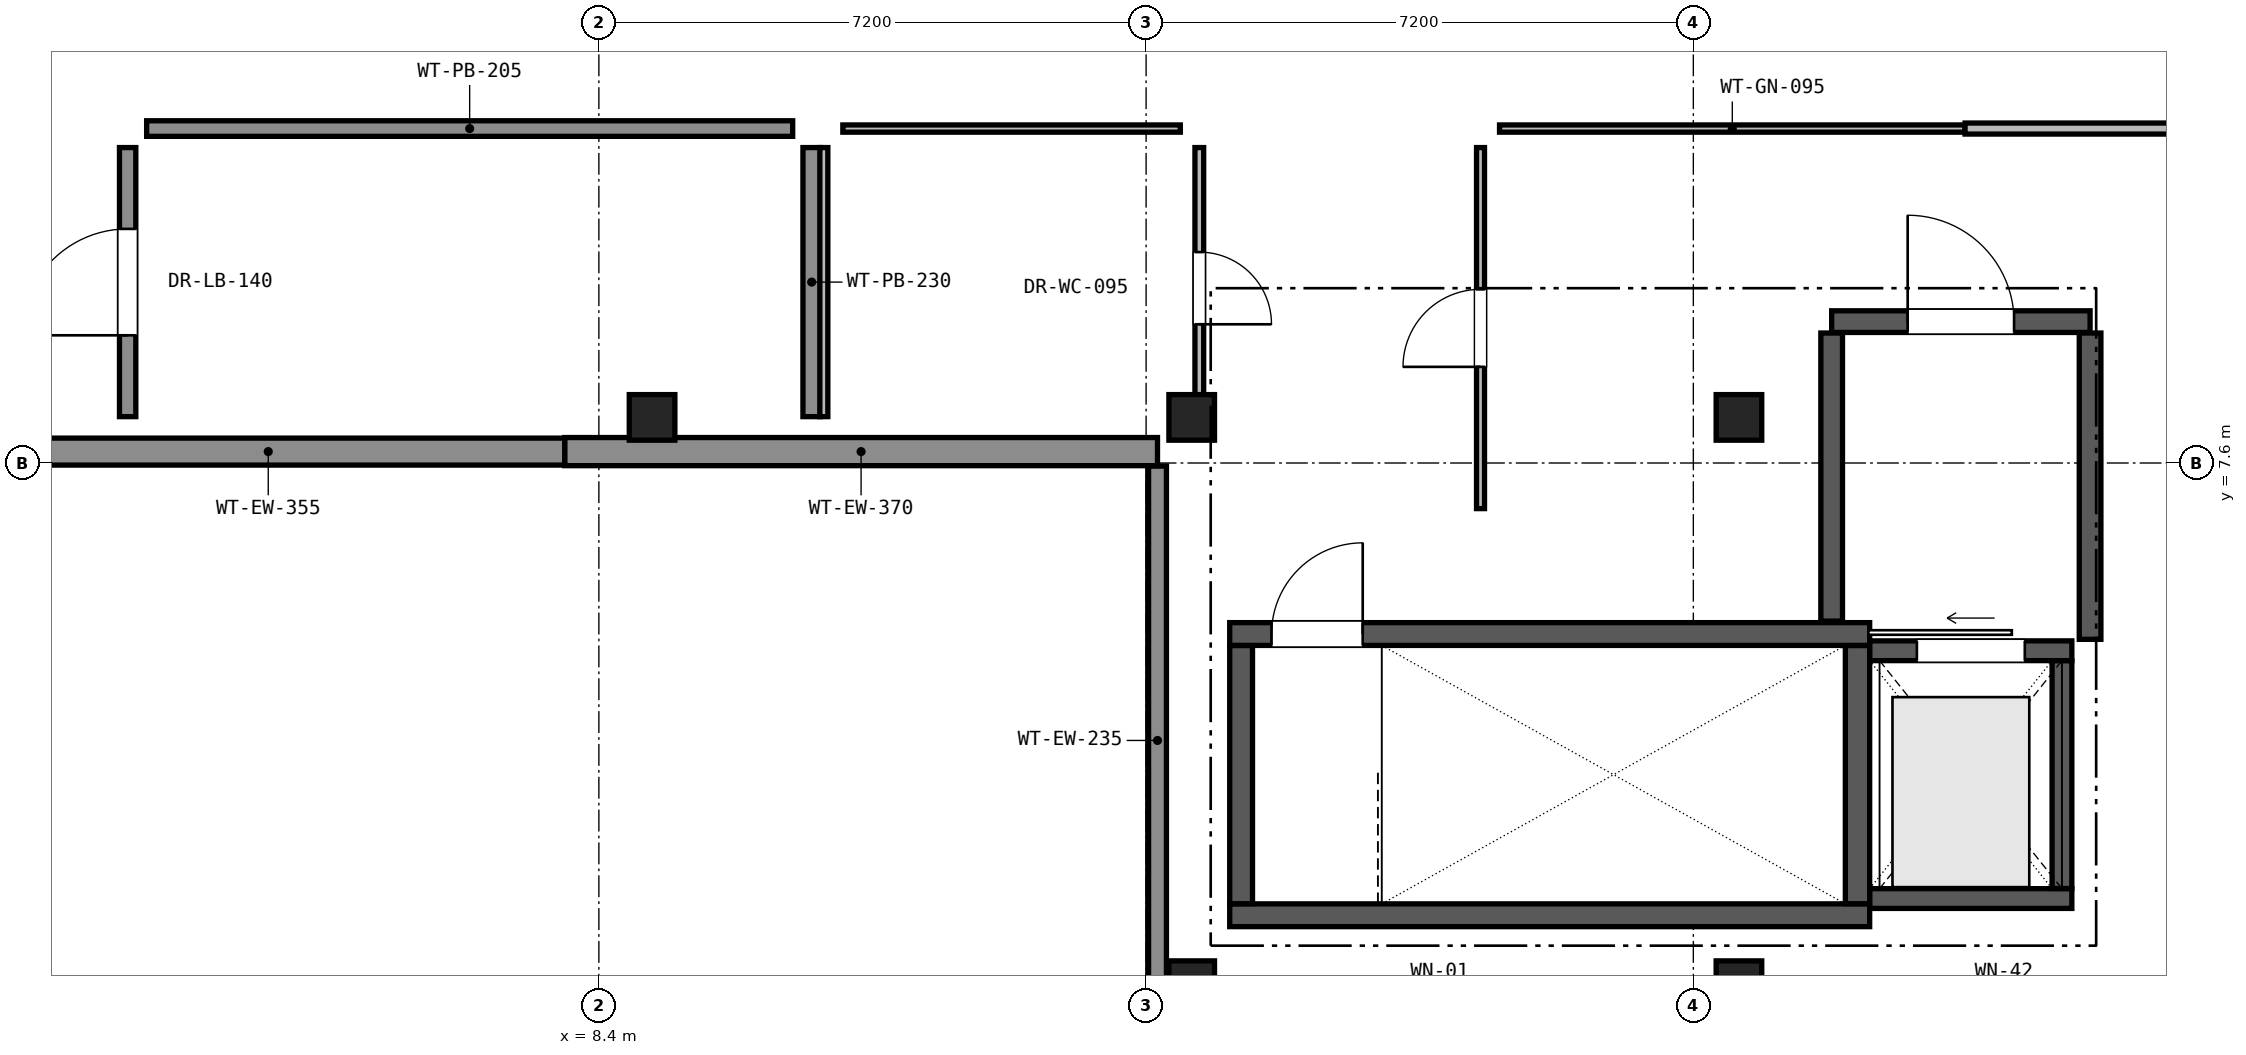
"""IFC4 building model, lengths in metres.
Left out: names, types, materials, properties, quantities, classifications, styles, units other than length and angle.
Written with IfcOpenShell. Run it as: python <this file> out.ifc"""

import sys

from ifc_helpers import new_model, si_unit, direction, frame, frame_2d, origin, origin_2d, place, context, subcontext, project, spatial, rectangle, extrude, element, fill, save


model = new_model("IFC4")
c1 = context("Model", 3, precision=1e-05, world=origin(), true_north=direction((0.0, 1.0)))
c2 = subcontext(c1, "Body", "Model", "MODEL_VIEW")
j1 = project(units=[si_unit("LENGTHUNIT", "METRE"), si_unit("PLANEANGLEUNIT", "RADIAN")], contexts=[c1])
p1 = place(None, origin())
s1 = spatial("IfcSite", under=j1, at=p1, CompositionType="ELEMENT")
p2 = place(p1, origin())
s2 = spatial("IfcBuilding", under=s1, at=p2, CompositionType="ELEMENT")
p3 = place(p2, frame((0.0, 0.0, 21.76)))
s3 = spatial("IfcBuildingStorey", under=s2, at=p3, CompositionType="ELEMENT", Elevation=21.76)
for number, where, z_axis, x_axis in (
    (1, (9.1, 8.2, 0.0), (0.0, 0.0, 1.0), (1.0, 0.0, 0.0)),
    (2, (16.2, 0.75, 0.0), (0.0, 0.0, 1.0), (1.0, 0.0, 0.0)),
    (3, (16.2, 8.2, 0.0), (0.0, 0.0, 1.0), (1.0, 0.0, 0.0)),
    (4, (23.4, 0.75, 0.0), (0.0, 0.0, 1.0), (1.0, 0.0, 0.0)),
    (5, (23.4, 8.2, 0.0), (0.0, 0.0, 1.0), (1.0, 0.0, 0.0)),
):
    element("IfcColumn", number, at=place(p3, frame(where, z_axis=z_axis, x_axis=x_axis)), inside=s3, PredefinedType="COLUMN", context=c2, shape_type="SweptSolid", body=[
        extrude(rectangle(XDim=0.6, YDim=0.6, at=origin_2d()), origin(), (0.0, 0.0, 1.0), 4.08),
    ])
p4 = place(p3, frame((15.75, 0.34, 0.0), z_axis=(0.0, 0.0, 1.0), x_axis=(0.0, 1.0, 0.0)))
e6 = element("IfcWall", 6, at=p4, inside=s3, PredefinedType="SOLIDWALL", context=c2, shape_type="SweptSolid", body=[
    extrude(rectangle(XDim=7.22, YDim=0.235, at=frame_2d((3.61, 0.0))), origin(), (0.0, 0.0, 1.0), 3.81),
])
p5 = place(p3, frame((15.75, 7.75, 0.0), z_axis=(0.0, 0.0, 1.0), x_axis=(-1.0, 0.0, 0.0)))
e7 = element("IfcWall", 7, at=p5, inside=s3, PredefinedType="SOLIDWALL", context=c2, shape_type="SweptSolid", body=[
    extrude(rectangle(XDim=7.8, YDim=0.37, at=frame_2d((3.9, 0.0))), origin(), (0.0, 0.0, 1.0), 3.81),
])
p6 = place(p3, frame((7.95, 7.75, 0.0), z_axis=(0.0, 0.0, 1.0), x_axis=(-1.0, 0.0, 0.0)))
e8 = element("IfcWall", 8, at=p6, inside=s3, PredefinedType="SOLIDWALL", context=c2, shape_type="SweptSolid", body=[
    extrude(rectangle(XDim=7.8, YDim=0.355, at=frame_2d((3.9, 0.0))), origin(), (0.0, 0.0, 1.0), 3.81),
])
p7 = place(p3, frame((0.13, 7.73, 4.08), z_axis=(0.0, 0.0, 1.0), x_axis=(1.0, 0.0, 0.0)))
e9 = element("IfcWall", 9, at=p7, inside=s3, PredefinedType="PARAPET", context=c2, shape_type="SweptSolid", body=[
    extrude(rectangle(XDim=15.6, YDim=0.245, at=frame_2d((7.8, 0.0))), origin(), (0.0, 0.0, 1.0), 1.2),
])
p8 = place(p3, frame((15.73, 7.58, 4.08), z_axis=(0.0, 0.0, 1.0), x_axis=(0.0, -1.0, 0.0)))
e10 = element("IfcWall", 10, at=p8, inside=s3, PredefinedType="PARAPET", context=c2, shape_type="SweptSolid", body=[
    extrude(rectangle(XDim=7.3, YDim=0.245, at=frame_2d((3.65, 0.0))), origin(), (0.0, 0.0, 1.0), 1.2),
])
p9 = place(p3, frame((16.7, 1.65, 0.0), z_axis=(0.0, 0.0, 1.0), x_axis=(1.0, 0.0, 0.0)))
e11 = element("IfcWall", 11, at=p9, inside=s3, PredefinedType="SHEAR", context=c2, shape_type="SweptSolid", body=[
    extrude(rectangle(XDim=8.42, YDim=0.3, at=frame_2d((4.21, 0.0))), origin(), (0.0, 0.0, 1.0), 3.81),
])
p10 = place(p3, frame((16.7, 5.35, 0.0), z_axis=(0.0, 0.0, 1.0), x_axis=(1.0, 0.0, 0.0)))
e12 = element("IfcWall", 12, at=p10, inside=s3, PredefinedType="SHEAR", context=c2, shape_type="SweptSolid", body=[
    extrude(rectangle(XDim=8.42, YDim=0.3, at=frame_2d((4.21, 0.0))), origin(), (0.0, 0.0, 1.0), 3.81),
])
p11 = place(p10, frame((0.55, 0.0, 0.0)))
e13 = element("IfcOpeningElement", 13, at=p11, cuts=e12, PredefinedType="OPENING", context=c2, shape_type="SweptSolid", body=[
    extrude(rectangle(XDim=1.2, YDim=2.2, at=frame_2d((0.6, 1.1))), frame((0.0, 0.16, 0.0), z_axis=(0.0, -1.0, 0.0), x_axis=(1.0, 0.0, 0.0)), (0.0, 0.0, 1.0), 0.32),
])
p12 = place(p3, frame((16.85, 1.802, 0.0), z_axis=(0.0, 0.0, 1.0), x_axis=(0.0, 1.0, 0.0)))
e14 = element("IfcWall", 14, at=p12, inside=s3, PredefinedType="SHEAR", context=c2, shape_type="SweptSolid", body=[
    extrude(rectangle(XDim=3.396, YDim=0.3, at=frame_2d((1.698, 0.0))), origin(), (0.0, 0.0, 1.0), 3.81),
])
p13 = place(p3, frame((24.96, 1.802, 0.0), z_axis=(0.0, 0.0, 1.0), x_axis=(0.0, 1.0, 0.0)))
e15 = element("IfcWall", 15, at=p13, inside=s3, PredefinedType="SHEAR", context=c2, shape_type="SweptSolid", body=[
    extrude(rectangle(XDim=3.396, YDim=0.32, at=frame_2d((1.698, 0.0))), origin(), (0.0, 0.0, 1.0), 3.81),
])
p14 = place(p3, frame((25.122, 1.87, 0.0), z_axis=(0.0, 0.0, 1.0), x_axis=(1.0, 0.0, 0.0)))
e16 = element("IfcWall", 16, at=p14, inside=s3, PredefinedType="SHEAR", context=c2, shape_type="SweptSolid", body=[
    extrude(rectangle(XDim=2.658, YDim=0.26, at=frame_2d((1.329, 0.0))), origin(), (0.0, 0.0, 1.0), 3.81),
])
p15 = place(p3, frame((25.122, 5.13, 0.0), z_axis=(0.0, 0.0, 1.0), x_axis=(1.0, 0.0, 0.0)))
e17 = element("IfcWall", 17, at=p15, inside=s3, PredefinedType="SHEAR", context=c2, shape_type="SweptSolid", body=[
    extrude(rectangle(XDim=2.658, YDim=0.26, at=frame_2d((1.329, 0.0))), origin(), (0.0, 0.0, 1.0), 3.81),
])
p16 = place(p15, frame((0.619, 0.0, 0.0)))
e18 = element("IfcOpeningElement", 18, at=p16, cuts=e17, PredefinedType="OPENING", context=c2, shape_type="SweptSolid", body=[
    extrude(rectangle(XDim=1.42, YDim=2.25, at=frame_2d((0.71, 1.125))), frame((0.0, 0.14, 0.0), z_axis=(0.0, -1.0, 0.0), x_axis=(1.0, 0.0, 0.0)), (0.0, 0.0, 1.0), 0.28),
])
p17 = place(p3, frame((27.65, 2.002, 0.0), z_axis=(0.0, 0.0, 1.0), x_axis=(0.0, 1.0, 0.0)))
e19 = element("IfcWall", 19, at=p17, inside=s3, PredefinedType="SHEAR", context=c2, shape_type="SweptSolid", body=[
    extrude(rectangle(XDim=2.996, YDim=0.26, at=frame_2d((1.498, 0.0))), origin(), (0.0, 0.0, 1.0), 3.81),
])
p18 = place(p3, frame((24.62, 9.46, 0.0), z_axis=(0.0, 0.0, 1.0), x_axis=(1.0, 0.0, 0.0)))
e20 = element("IfcWall", 20, at=p18, inside=s3, PredefinedType="SHEAR", context=c2, shape_type="SweptSolid", body=[
    extrude(rectangle(XDim=3.4, YDim=0.285, at=frame_2d((1.7, 0.0))), origin(), (0.0, 0.0, 1.0), 3.81),
])
p19 = place(p18, frame((1.0, 0.0, 0.0)))
e21 = element("IfcOpeningElement", 21, at=p19, cuts=e20, PredefinedType="OPENING", context=c2, shape_type="SweptSolid", body=[
    extrude(rectangle(XDim=1.4, YDim=2.25, at=frame_2d((0.7, 1.125))), frame((0.0, 0.152, 0.0), z_axis=(0.0, -1.0, 0.0), x_axis=(1.0, 0.0, 0.0)), (0.0, 0.0, 1.0), 0.305),
])
p20 = place(p3, frame((24.62, 5.52, 0.0), z_axis=(0.0, 0.0, 1.0), x_axis=(0.0, 1.0, 0.0)))
e22 = element("IfcWall", 22, at=p20, inside=s3, PredefinedType="SHEAR", context=c2, shape_type="SweptSolid", body=[
    extrude(rectangle(XDim=3.79, YDim=0.285, at=frame_2d((1.895, 0.0))), origin(), (0.0, 0.0, 1.0), 2.86),
])
p21 = place(p3, frame((28.02, 5.28, 0.0), z_axis=(0.0, 0.0, 1.0), x_axis=(0.0, 1.0, 0.0)))
e23 = element("IfcWall", 23, at=p21, inside=s3, PredefinedType="SHEAR", context=c2, shape_type="SweptSolid", body=[
    extrude(rectangle(XDim=4.03, YDim=0.285, at=frame_2d((2.015, 0.0))), origin(), (0.0, 0.0, 1.0), 2.86),
])
p22 = place(p3, frame((20.0, 7.0, 0.0), z_axis=(0.0, 0.0, 1.0), x_axis=(0.0, 1.0, 0.0)))
e24 = element("IfcWall", 24, at=p22, inside=s3, PredefinedType="PARTITIONING", context=c2, shape_type="SweptSolid", body=[
    extrude(rectangle(XDim=4.75, YDim=0.105, at=frame_2d((2.375, 0.0))), origin(), (0.0, 0.0, 1.0), 2.86),
])
p23 = place(p22, frame((1.865, 0.0, 0.0)))
e25 = element("IfcOpeningElement", 25, at=p23, cuts=e24, PredefinedType="OPENING", context=c2, shape_type="SweptSolid", body=[
    extrude(rectangle(XDim=1.02, YDim=2.15, at=frame_2d((0.51, 1.075))), frame((0.0, 0.062, 0.0), z_axis=(0.0, -1.0, 0.0), x_axis=(1.0, 0.0, 0.0)), (0.0, 0.0, 1.0), 0.125),
])
p24 = place(p3, frame((20.25, 12.0, 0.0), z_axis=(0.0, 0.0, 1.0), x_axis=(1.0, 0.0, 0.0)))
e26 = element("IfcWall", 26, at=p24, inside=s3, PredefinedType="PARTITIONING", context=c2, shape_type="SweptSolid", body=[
    extrude(rectangle(XDim=6.125, YDim=0.095, at=frame_2d((3.062, 0.0))), origin(), (0.0, 0.0, 1.0), 3.21),
])
p25 = place(p3, frame((26.375, 12.0, 0.0), z_axis=(0.0, 0.0, 1.0), x_axis=(1.0, 0.0, 0.0)))
e27 = element("IfcWall", 27, at=p25, inside=s3, PredefinedType="PARTITIONING", context=c2, shape_type="SweptSolid", body=[
    extrude(rectangle(XDim=6.125, YDim=0.145, at=frame_2d((3.062, 0.0))), origin(), (0.0, 0.0, 1.0), 3.06),
])
p26 = place(p3, frame((11.2, 11.75, 0.0), z_axis=(0.0, 0.0, 1.0), x_axis=(0.0, -1.0, 0.0)))
e28 = element("IfcWall", 28, at=p26, inside=s3, PredefinedType="PARTITIONING", context=c2, shape_type="SweptSolid", body=[
    extrude(rectangle(XDim=3.54, YDim=0.23, at=frame_2d((1.77, 0.0))), origin(), (0.0, 0.0, 1.0), 2.86),
])
p27 = place(p3, frame((2.2, 8.21, 0.0), z_axis=(0.0, 0.0, 1.0), x_axis=(0.0, 1.0, 0.0)))
e29 = element("IfcWall", 29, at=p27, inside=s3, PredefinedType="PARTITIONING", context=c2, shape_type="SweptSolid", body=[
    extrude(rectangle(XDim=3.54, YDim=0.215, at=frame_2d((1.77, 0.0))), origin(), (0.0, 0.0, 1.0), 2.86),
])
p28 = place(p27, frame((1.07, 0.0, 0.0)))
e30 = element("IfcOpeningElement", 30, at=p28, cuts=e29, PredefinedType="OPENING", context=c2, shape_type="SweptSolid", body=[
    extrude(rectangle(XDim=1.4, YDim=2.2, at=frame_2d((0.7, 1.1))), frame((0.0, 0.117, 0.0), z_axis=(0.0, -1.0, 0.0), x_axis=(1.0, 0.0, 0.0)), (0.0, 0.0, 1.0), 0.235),
])
p29 = place(p3, frame((2.45, 12.0, 0.0), z_axis=(0.0, 0.0, 1.0), x_axis=(1.0, 0.0, 0.0)))
e31 = element("IfcWall", 31, at=p29, inside=s3, PredefinedType="PARTITIONING", context=c2, shape_type="SweptSolid", body=[
    extrude(rectangle(XDim=8.5, YDim=0.205, at=frame_2d((4.25, 0.0))), origin(), (0.0, 0.0, 1.0), 3.16),
])
p30 = place(p3, frame((16.3, 11.75, 0.0), z_axis=(0.0, 0.0, 1.0), x_axis=(0.0, -1.0, 0.0)))
e32 = element("IfcWall", 32, at=p30, inside=s3, PredefinedType="PARTITIONING", context=c2, shape_type="SweptSolid", body=[
    extrude(rectangle(XDim=3.7, YDim=0.115, at=frame_2d((1.85, 0.0))), origin(), (0.0, 0.0, 1.0), 2.86),
])
p31 = place(p30, frame((1.375, 0.0, 0.0)))
e33 = element("IfcOpeningElement", 33, at=p31, cuts=e32, PredefinedType="OPENING", context=c2, shape_type="SweptSolid", body=[
    extrude(rectangle(XDim=0.95, YDim=2.15, at=frame_2d((0.475, 1.075))), frame((0.0, 0.067, 0.0), z_axis=(0.0, -1.0, 0.0), x_axis=(1.0, 0.0, 0.0)), (0.0, 0.0, 1.0), 0.135),
])
p32 = place(p3, frame((11.36, 8.21, 0.0), z_axis=(0.0, 0.0, 1.0), x_axis=(0.0, 1.0, 0.0)))
e34 = element("IfcWall", 34, at=p32, inside=s3, PredefinedType="PARTITIONING", context=c2, shape_type="SweptSolid", body=[
    extrude(rectangle(XDim=3.54, YDim=0.105, at=frame_2d((1.77, 0.0))), origin(), (0.0, 0.0, 1.0), 2.86),
])
p33 = place(p3, frame((11.61, 12.0, 0.0), z_axis=(0.0, 0.0, 1.0), x_axis=(1.0, 0.0, 0.0)))
e35 = element("IfcWall", 35, at=p33, inside=s3, PredefinedType="PARTITIONING", context=c2, shape_type="SweptSolid", body=[
    extrude(rectangle(XDim=4.44, YDim=0.095, at=frame_2d((2.22, 0.0))), origin(), (0.0, 0.0, 1.0), 3.01),
])
p34 = place(p11, origin())
e36 = element("IfcDoor", 36, at=p34, inside=s3, OperationType="SINGLE_SWING_RIGHT", PredefinedType="DOOR", context=c2, shape_type="SweptSolid", body=[
    extrude(rectangle(XDim=1.2, YDim=2.2, at=frame_2d((0.6, 1.1))), frame((0.0, 0.025, 0.0), z_axis=(0.0, -1.0, 0.0), x_axis=(1.0, 0.0, 0.0)), (0.0, 0.0, 1.0), 0.05),
])
fill(e13, e36)
p35 = place(p16, origin())
e37 = element("IfcDoor", 37, at=p35, inside=s3, OperationType="SLIDING_TO_LEFT", PredefinedType="DOOR", context=c2, shape_type="SweptSolid", body=[
    extrude(rectangle(XDim=1.42, YDim=2.25, at=frame_2d((0.71, 1.125))), frame((0.0, 0.025, 0.0), z_axis=(0.0, -1.0, 0.0), x_axis=(1.0, 0.0, 0.0)), (0.0, 0.0, 1.0), 0.05),
])
fill(e18, e37)
p36 = place(p19, origin())
e38 = element("IfcDoor", 38, at=p36, inside=s3, OperationType="SINGLE_SWING_LEFT", PredefinedType="DOOR", context=c2, shape_type="SweptSolid", body=[
    extrude(rectangle(XDim=1.4, YDim=2.25, at=frame_2d((0.7, 1.125))), frame((0.0, 0.025, 0.0), z_axis=(0.0, -1.0, 0.0), x_axis=(1.0, 0.0, 0.0)), (0.0, 0.0, 1.0), 0.05),
])
fill(e21, e38)
p37 = place(p23, origin())
e39 = element("IfcDoor", 39, at=p37, inside=s3, OperationType="SINGLE_SWING_LEFT", PredefinedType="DOOR", context=c2, shape_type="SweptSolid", body=[
    extrude(rectangle(XDim=1.02, YDim=2.15, at=frame_2d((0.51, 1.075))), frame((0.0, 0.025, 0.0), z_axis=(0.0, -1.0, 0.0), x_axis=(1.0, 0.0, 0.0)), (0.0, 0.0, 1.0), 0.05),
])
fill(e25, e39)
p38 = place(p28, origin())
e40 = element("IfcDoor", 40, at=p38, inside=s3, OperationType="SINGLE_SWING_LEFT", PredefinedType="DOOR", context=c2, shape_type="SweptSolid", body=[
    extrude(rectangle(XDim=1.4, YDim=2.2, at=frame_2d((0.7, 1.1))), frame((0.0, 0.025, 0.0), z_axis=(0.0, -1.0, 0.0), x_axis=(1.0, 0.0, 0.0)), (0.0, 0.0, 1.0), 0.05),
])
fill(e30, e40)
p39 = place(p31, origin())
e41 = element("IfcDoor", 41, at=p39, inside=s3, OperationType="SINGLE_SWING_RIGHT", PredefinedType="DOOR", context=c2, shape_type="SweptSolid", body=[
    extrude(rectangle(XDim=0.95, YDim=2.15, at=frame_2d((0.475, 1.075))), frame((0.0, 0.025, 0.0), z_axis=(0.0, -1.0, 0.0), x_axis=(1.0, 0.0, 0.0)), (0.0, 0.0, 1.0), 0.05),
])
fill(e33, e41)
save(model, sys.argv[1])
